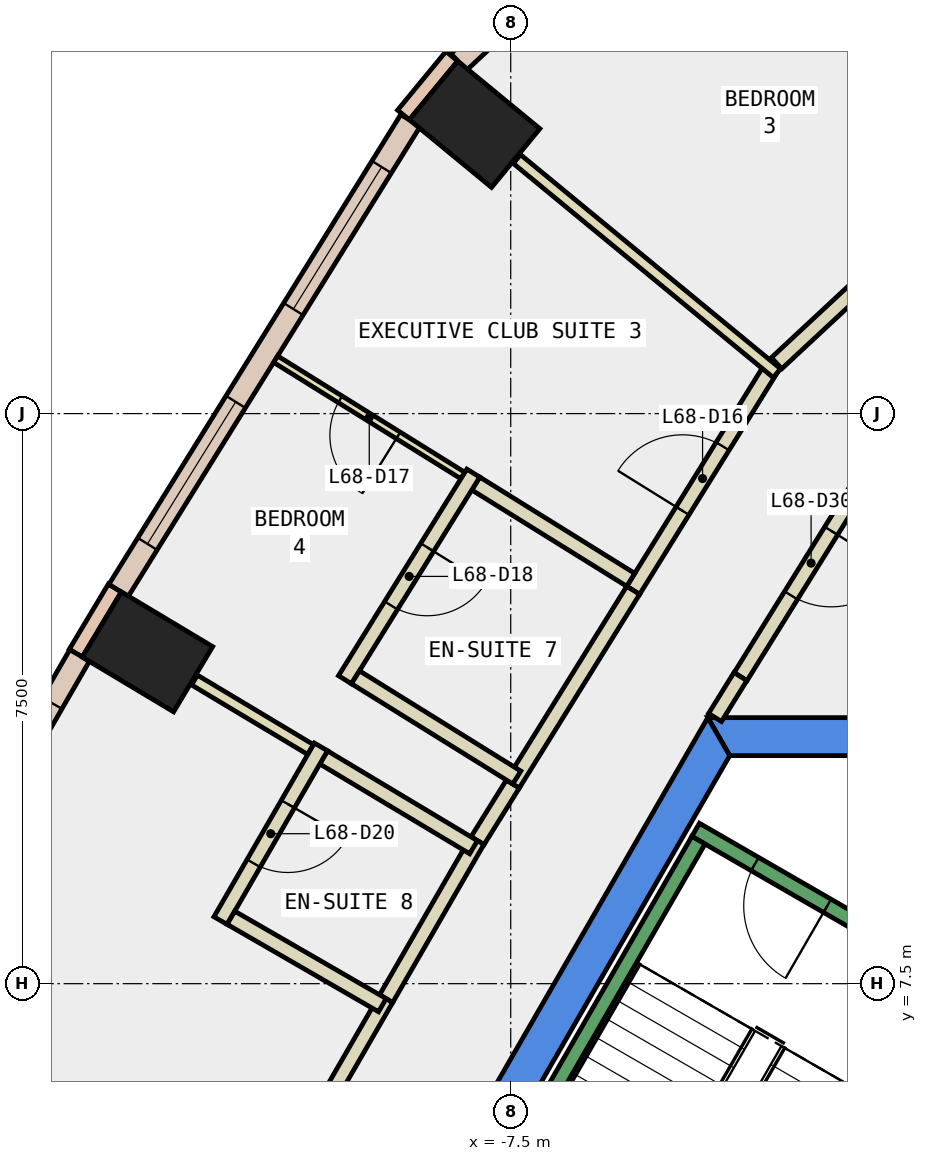
"""IFC4 building model, lengths in metres.
Left out: names, types, materials, properties, quantities, classifications, styles, units other than length and angle.
Written with IfcOpenShell. Run it as: python <this file> out.ifc"""

import sys

from ifc_helpers import new_model, si_unit, direction, frame, frame_2d, origin, origin_2d, place, context, subcontext, project, spatial, polyline, rectangle, outline, extrude, element, fill, save


model = new_model("IFC4")
c1 = context("Model", 3, precision=1e-05, world=origin(), true_north=direction((0.0, 1.0)))
c2 = subcontext(c1, "Body", "Model", "MODEL_VIEW")
j1 = project(units=[si_unit("LENGTHUNIT", "METRE"), si_unit("PLANEANGLEUNIT", "RADIAN")], contexts=[c1])
p1 = place(None, origin())
s1 = spatial("IfcSite", under=j1, at=p1, CompositionType="ELEMENT")
p2 = place(p1, origin())
s2 = spatial("IfcBuilding", under=s1, at=p2, CompositionType="ELEMENT")
p3 = place(p2, frame((0.0, 0.0, 293.6)))
s3 = spatial("IfcBuildingStorey", under=s2, at=p3, CompositionType="ELEMENT", Elevation=293.6)
for number, where, z_axis, x_axis in (
    (1, (-7.975, 18.807, -0.34), (0.0, 0.0, 1.0), (0.636, 0.772, 0.0)),
    (2, (-12.279, 11.865, -0.34), (0.0, 0.0, 1.0), (0.514, 0.858, 0.0)),
):
    element("IfcColumn", number, at=place(p3, frame(where, z_axis=z_axis, x_axis=x_axis)), inside=s3, PredefinedType="COLUMN", context=c2, shape_type="SweptSolid", body=[
        extrude(rectangle(XDim=1.0, YDim=1.4, at=origin_2d()), origin(), (0.0, 0.0, 1.0), 3.6),
    ])
p4 = place(p3, frame((0.0, 0.0, -0.34)))
e3 = element("IfcWall", 3, at=p4, inside=s3, PredefinedType="SHEAR", context=c2, shape_type="SweptSolid", body=[
    extrude(outline(polyline([(4.907, 11.0), (-4.907, 11.0), (-4.619, 10.5), (4.619, 10.5), (4.907, 11.0)])), origin(), (0.0, 0.0, 1.0), 3.6),
])
p5 = place(p3, frame((0.0, 0.0, -0.34)))
e4 = element("IfcWall", 4, at=p5, inside=s3, PredefinedType="SHEAR", context=c2, shape_type="SweptSolid", body=[
    extrude(outline(polyline([(-9.236, 3.502), (-8.803, 3.253), (-4.619, 10.5), (-4.907, 11.0), (-9.236, 3.502)])), origin(), (0.0, 0.0, 1.0), 3.6),
])
for number, where, z_axis, x_axis in (
    (5, (-8.275, 19.701, 0.0), (0.0, 0.0, 1.0), (-0.636, -0.772, 0.0)),
    (6, (-12.708, 12.706, 0.0), (0.0, 0.0, 1.0), (-0.514, -0.858, 0.0)),
):
    element("IfcWall", number, at=place(p3, frame(where, z_axis=z_axis, x_axis=x_axis)), inside=s3, PredefinedType="STANDARD", context=c2, shape_type="SweptSolid", body=[
        extrude(rectangle(XDim=1.0, YDim=0.2, at=frame_2d((0.5, 0.0))), origin(), (0.0, 0.0, 1.0), 3.26),
    ])
p6 = place(p3, frame((-5.241, 22.362, 0.0), z_axis=(0.0, 0.0, 1.0), x_axis=(-0.732397380344, -0.680877431896, 0.0)))
e7 = element("IfcWall", 7, at=p6, inside=s3, PredefinedType="STANDARD", context=c2, shape_type="SweptSolid", body=[
    extrude(rectangle(XDim=4.019, YDim=0.3, at=frame_2d((2.009, 0.0))), origin(), (0.0, 0.0, 1.0), 3.26),
])
p7 = place(p6, frame((1.309, 0.0, 0.9)))
e8 = element("IfcOpeningElement", 8, at=p7, cuts=e7, PredefinedType="OPENING", context=c2, shape_type="SweptSolid", body=[
    extrude(rectangle(XDim=1.4, YDim=2.0, at=frame_2d((0.7, 1.0))), frame((0.0, 0.16, 0.0), z_axis=(0.0, -1.0, 0.0), x_axis=(1.0, 0.0, 0.0)), (0.0, 0.0, 1.0), 0.32),
])
p8 = place(p3, frame((-8.819, 18.855, 0.0), z_axis=(0.0, 0.0, 1.0), x_axis=(-0.527762071678, -0.849392250788, 0.0)))
e9 = element("IfcWall", 9, at=p8, inside=s3, PredefinedType="STANDARD", context=c2, shape_type="SweptSolid", body=[
    extrude(rectangle(XDim=7.276, YDim=0.3, at=frame_2d((3.638, 0.0))), origin(), (0.0, 0.0, 1.0), 3.26),
])
p9 = place(p8, frame((0.719, 0.0, 0.9)))
e10 = element("IfcOpeningElement", 10, at=p9, cuts=e9, PredefinedType="OPENING", context=c2, shape_type="SweptSolid", body=[
    extrude(rectangle(XDim=2.2, YDim=2.0, at=frame_2d((1.1, 1.0))), frame((0.0, 0.16, 0.0), z_axis=(0.0, -1.0, 0.0), x_axis=(1.0, 0.0, 0.0)), (0.0, 0.0, 1.0), 0.32),
])
p10 = place(p8, frame((4.357, 0.0, 0.9)))
e11 = element("IfcOpeningElement", 11, at=p10, cuts=e9, PredefinedType="OPENING", context=c2, shape_type="SweptSolid", body=[
    extrude(rectangle(XDim=2.2, YDim=2.0, at=frame_2d((1.1, 1.0))), frame((0.0, 0.16, 0.0), z_axis=(0.0, -1.0, 0.0), x_axis=(1.0, 0.0, 0.0)), (0.0, 0.0, 1.0), 0.32),
])
p11 = place(p3, frame((-13.172, 11.819, 0.0), z_axis=(0.0, 0.0, 1.0), x_axis=(-0.499945412946, -0.866056917341, 0.0)))
e12 = element("IfcWall", 12, at=p11, inside=s3, PredefinedType="STANDARD", context=c2, shape_type="SweptSolid", body=[
    extrude(rectangle(XDim=7.299, YDim=0.3, at=frame_2d((3.649, 0.0))), origin(), (0.0, 0.0, 1.0), 3.26),
])
p12 = place(p11, frame((0.725, 0.0, 0.9)))
e13 = element("IfcOpeningElement", 13, at=p12, cuts=e12, PredefinedType="OPENING", context=c2, shape_type="SweptSolid", body=[
    extrude(rectangle(XDim=2.2, YDim=2.0, at=frame_2d((1.1, 1.0))), frame((0.0, 0.16, 0.0), z_axis=(0.0, -1.0, 0.0), x_axis=(1.0, 0.0, 0.0)), (0.0, 0.0, 1.0), 0.32),
])
p13 = place(p11, frame((4.374, 0.0, 0.9)))
e14 = element("IfcOpeningElement", 14, at=p13, cuts=e12, PredefinedType="OPENING", context=c2, shape_type="SweptSolid", body=[
    extrude(rectangle(XDim=2.2, YDim=2.0, at=frame_2d((1.1, 1.0))), frame((0.0, 0.16, 0.0), z_axis=(0.0, -1.0, 0.0), x_axis=(1.0, 0.0, 0.0)), (0.0, 0.0, 1.0), 0.32),
])
p14 = place(p3, frame((-2.62, 14.526, 0.0), z_axis=(0.0, 0.0, 1.0), x_axis=(-0.527787942423, -0.849376175692, 0.0)))
e15 = element("IfcWall", 15, at=p14, inside=s3, PredefinedType="PARTITIONING", context=c2, shape_type="SweptSolid", body=[
    extrude(rectangle(XDim=3.517, YDim=0.2, at=frame_2d((1.758, 0.0))), origin(), (0.0, 0.0, 1.0), 3.26),
])
p15 = place(p14, frame((1.258, 0.0, 0.0)))
e16 = element("IfcOpeningElement", 16, at=p15, cuts=e15, PredefinedType="OPENING", context=c2, shape_type="SweptSolid", body=[
    extrude(rectangle(XDim=1.0, YDim=2.1, at=frame_2d((0.5, 1.05))), frame((0.0, 0.11, 0.0), z_axis=(0.0, -1.0, 0.0), x_axis=(1.0, 0.0, 0.0)), (0.0, 0.0, 1.0), 0.22),
])
p16 = place(p3, frame((-4.478, 11.54, 0.0), z_axis=(0.0, 0.0, 1.0), x_axis=(-0.527362861778, -0.849640166198, 0.0)))
e17 = element("IfcWall", 17, at=p16, inside=s3, PredefinedType="PARTITIONING", context=c2, shape_type="SweptSolid", body=[
    extrude(rectangle(XDim=0.633, YDim=0.2, at=frame_2d((0.317, 0.0))), origin(), (0.0, 0.0, 1.0), 3.26),
])
p17 = place(p3, frame((-4.002, 15.663, 0.0), z_axis=(0.0, 0.0, 1.0), x_axis=(0.732331154554, 0.680948661846, 0.0)))
e18 = element("IfcWall", 18, at=p17, inside=s3, PredefinedType="PARTITIONING", context=c2, shape_type="SweptSolid", body=[
    extrude(rectangle(XDim=2.803, YDim=0.2, at=frame_2d((1.402, 0.0))), origin(), (0.0, 0.0, 1.0), 3.26),
])
p18 = place(p3, frame((-5.889, 12.675, 0.0), z_axis=(0.0, 0.0, 1.0), x_axis=(0.527550626699, 0.849523593709, 0.0)))
e19 = element("IfcWall", 19, at=p18, inside=s3, PredefinedType="PARTITIONING", context=c2, shape_type="SweptSolid", body=[
    extrude(rectangle(XDim=3.463, YDim=0.2, at=frame_2d((1.731, 0.0))), origin(), (0.0, 0.0, 1.0), 3.26),
])
p19 = place(p18, frame((1.231, 0.0, 0.0)))
e20 = element("IfcOpeningElement", 20, at=p19, cuts=e19, PredefinedType="OPENING", context=c2, shape_type="SweptSolid", body=[
    extrude(rectangle(XDim=1.0, YDim=2.1, at=frame_2d((0.5, 1.05))), frame((0.0, 0.11, 0.0), z_axis=(0.0, -1.0, 0.0), x_axis=(1.0, 0.0, 0.0)), (0.0, 0.0, 1.0), 0.22),
])
p20 = place(p3, frame((-7.937, 9.38, 0.0), z_axis=(0.0, 0.0, 1.0), x_axis=(0.52850186976, 0.848932137252, 0.0)))
e21 = element("IfcWall", 21, at=p20, inside=s3, PredefinedType="PARTITIONING", context=c2, shape_type="SweptSolid", body=[
    extrude(rectangle(XDim=0.88, YDim=0.2, at=frame_2d((0.44, 0.0))), origin(), (0.0, 0.0, 1.0), 3.26),
])
p21 = place(p3, frame((-7.472, 10.127, 0.0), z_axis=(0.0, 0.0, 1.0), x_axis=(0.527707224705, 0.849426326996, 0.0)))
e22 = element("IfcWall", 22, at=p21, inside=s3, PredefinedType="PARTITIONING", context=c2, shape_type="SweptSolid", body=[
    extrude(rectangle(XDim=3.0, YDim=0.2, at=frame_2d((1.5, 0.0))), origin(), (0.0, 0.0, 1.0), 3.26),
])
p22 = place(p3, frame((-12.082, 2.207, 0.0), z_axis=(0.0, 0.0, 1.0), x_axis=(0.500123454404, 0.865954115618, 0.0)))
e23 = element("IfcWall", 23, at=p22, inside=s3, PredefinedType="PARTITIONING", context=c2, shape_type="SweptSolid", body=[
    extrude(rectangle(XDim=5.885, YDim=0.2, at=frame_2d((2.942, 0.0))), origin(), (0.0, 0.0, 1.0), 3.26),
])
p23 = place(p22, frame((2.493, 0.0, 0.0)))
e24 = element("IfcOpeningElement", 24, at=p23, cuts=e23, PredefinedType="OPENING", context=c2, shape_type="SweptSolid", body=[
    extrude(rectangle(XDim=1.0, YDim=2.1, at=frame_2d((0.5, 1.05))), frame((0.0, 0.11, 0.0), z_axis=(0.0, -1.0, 0.0), x_axis=(1.0, 0.0, 0.0)), (0.0, 0.0, 1.0), 0.22),
])
p24 = place(p3, frame((-9.139, 7.303, 0.0), z_axis=(0.0, 0.0, 1.0), x_axis=(0.499869187296, 0.866100915363, 0.0)))
e25 = element("IfcWall", 25, at=p24, inside=s3, PredefinedType="PARTITIONING", context=c2, shape_type="SweptSolid", body=[
    extrude(rectangle(XDim=2.401, YDim=0.2, at=frame_2d((1.2, 0.0))), origin(), (0.0, 0.0, 1.0), 3.26),
])
p25 = place(p3, frame((-3.998, 15.532, 0.0), z_axis=(0.0, 0.0, 1.0), x_axis=(-0.771938186867, 0.635697597649, 0.0)))
e26 = element("IfcWall", 26, at=p25, inside=s3, PredefinedType="PARTITIONING", context=c2, shape_type="SweptSolid", body=[
    extrude(rectangle(XDim=4.432, YDim=0.15, at=frame_2d((2.216, 0.0))), origin(), (0.0, 0.0, 1.0), 3.26),
])
p26 = place(p3, frame((-8.13, 14.185, 0.0), z_axis=(0.0, 0.0, 1.0), x_axis=(-0.849305726881, 0.527901299759, 0.0)))
e27 = element("IfcWall", 27, at=p26, inside=s3, PredefinedType="PARTITIONING", context=c2, shape_type="SweptSolid", body=[
    extrude(rectangle(XDim=2.9, YDim=0.1, at=frame_2d((1.45, 0.0))), origin(), (0.0, 0.0, 1.0), 3.26),
])
p27 = place(p26, frame((1.0, 0.0, 0.0)))
e28 = element("IfcOpeningElement", 28, at=p27, cuts=e27, PredefinedType="OPENING", context=c2, shape_type="SweptSolid", body=[
    extrude(rectangle(XDim=0.9, YDim=2.1, at=frame_2d((0.45, 1.05))), frame((0.0, 0.06, 0.0), z_axis=(0.0, -1.0, 0.0), x_axis=(1.0, 0.0, 0.0)), (0.0, 0.0, 1.0), 0.12),
])
p28 = place(p3, frame((-5.921, 12.813, 0.0), z_axis=(0.0, 0.0, 1.0), x_axis=(-0.849366650736, 0.527803270752, 0.0)))
e29 = element("IfcWall", 29, at=p28, inside=s3, PredefinedType="PARTITIONING", context=c2, shape_type="SweptSolid", body=[
    extrude(rectangle(XDim=2.401, YDim=0.2, at=frame_2d((1.2, 0.0))), origin(), (0.0, 0.0, 1.0), 3.26),
])
p29 = place(p3, frame((-7.992, 14.217, 0.0), z_axis=(0.0, 0.0, 1.0), x_axis=(-0.527795797674, -0.849371294522, 0.0)))
e30 = element("IfcWall", 30, at=p29, inside=s3, PredefinedType="PARTITIONING", context=c2, shape_type="SweptSolid", body=[
    extrude(rectangle(XDim=3.2, YDim=0.2, at=frame_2d((1.6, 0.0))), origin(), (0.0, 0.0, 1.0), 3.26),
])
p30 = place(p29, frame((1.15, 0.0, 0.0)))
e31 = element("IfcOpeningElement", 31, at=p30, cuts=e30, PredefinedType="OPENING", context=c2, shape_type="SweptSolid", body=[
    extrude(rectangle(XDim=0.9, YDim=2.1, at=frame_2d((0.45, 1.05))), frame((0.0, 0.11, 0.0), z_axis=(0.0, -1.0, 0.0), x_axis=(1.0, 0.0, 0.0)), (0.0, 0.0, 1.0), 0.22),
])
p31 = place(p3, frame((-9.543, 11.531, 0.0), z_axis=(0.0, 0.0, 1.0), x_axis=(0.849400119549, -0.527749407305, 0.0)))
e32 = element("IfcWall", 32, at=p31, inside=s3, PredefinedType="PARTITIONING", context=c2, shape_type="SweptSolid", body=[
    extrude(rectangle(XDim=2.5, YDim=0.2, at=frame_2d((1.25, 0.0))), origin(), (0.0, 0.0, 1.0), 3.26),
])
p32 = place(p3, frame((-10.133, 10.58, 0.0), z_axis=(0.0, 0.0, 1.0), x_axis=(-0.857903919212, 0.513810145287, 0.0)))
e33 = element("IfcWall", 33, at=p32, inside=s3, PredefinedType="PARTITIONING", context=c2, shape_type="SweptSolid", body=[
    extrude(rectangle(XDim=1.781, YDim=0.15, at=frame_2d((0.891, 0.0))), origin(), (0.0, 0.0, 1.0), 3.26),
])
p33 = place(p3, frame((-7.989, 9.295, 0.0), z_axis=(0.0, 0.0, 1.0), x_axis=(-0.857801856135, 0.513980520654, 0.0)))
e34 = element("IfcWall", 34, at=p33, inside=s3, PredefinedType="PARTITIONING", context=c2, shape_type="SweptSolid", body=[
    extrude(rectangle(XDim=2.3, YDim=0.2, at=frame_2d((1.15, 0.0))), origin(), (0.0, 0.0, 1.0), 3.26),
])
p34 = place(p3, frame((-9.997, 10.615, 0.0), z_axis=(0.0, 0.0, 1.0), x_axis=(-0.500525697837, -0.865721679182, 0.0)))
e35 = element("IfcWall", 35, at=p34, inside=s3, PredefinedType="PARTITIONING", context=c2, shape_type="SweptSolid", body=[
    extrude(rectangle(XDim=2.639, YDim=0.2, at=frame_2d((1.32, 0.0))), origin(), (0.0, 0.0, 1.0), 3.26),
])
p35 = place(p34, frame((0.869, 0.0, 0.0)))
e36 = element("IfcOpeningElement", 36, at=p35, cuts=e35, PredefinedType="OPENING", context=c2, shape_type="SweptSolid", body=[
    extrude(rectangle(XDim=0.9, YDim=2.1, at=frame_2d((0.45, 1.05))), frame((0.0, 0.11, 0.0), z_axis=(0.0, -1.0, 0.0), x_axis=(1.0, 0.0, 0.0)), (0.0, 0.0, 1.0), 0.22),
])
p36 = place(p3, frame((-11.181, 8.367, 0.0), z_axis=(0.0, 0.0, 1.0), x_axis=(0.866053019151, -0.499952165731, 0.0)))
e37 = element("IfcWall", 37, at=p36, inside=s3, PredefinedType="PARTITIONING", context=c2, shape_type="SweptSolid", body=[
    extrude(rectangle(XDim=2.3, YDim=0.2, at=frame_2d((1.15, 0.0))), origin(), (0.0, 0.0, 1.0), 3.26),
])
p37 = place(p3, frame((-1.256, 7.324, 0.0), z_axis=(0.0, 0.0, 1.0), x_axis=(-0.866046073146, 0.499964197906, 0.0)))
e38 = element("IfcWall", 38, at=p37, inside=s3, PredefinedType="STANDARD", context=c2, shape_type="SweptSolid", body=[
    extrude(rectangle(XDim=4.4, YDim=0.2, at=frame_2d((2.2, 0.0))), origin(), (0.0, 0.0, 1.0), 3.26),
])
p38 = place(p37, frame((2.4, 0.0, 0.0)))
e39 = element("IfcOpeningElement", 39, at=p38, cuts=e38, PredefinedType="OPENING", context=c2, shape_type="SweptSolid", body=[
    extrude(rectangle(XDim=1.1, YDim=2.2, at=frame_2d((0.55, 1.1))), frame((0.0, 0.11, 0.0), z_axis=(0.0, -1.0, 0.0), x_axis=(1.0, 0.0, 0.0)), (0.0, 0.0, 1.0), 0.22),
])
p39 = place(p3, frame((-1.393, 7.288, 0.0), z_axis=(0.0, 0.0, 1.0), x_axis=(-0.499963383562, -0.866046543262, 0.0)))
e40 = element("IfcWall", 40, at=p39, inside=s3, PredefinedType="STANDARD", context=c2, shape_type="SweptSolid", body=[
    extrude(rectangle(XDim=6.9, YDim=0.2, at=frame_2d((3.45, 0.0))), origin(), (0.0, 0.0, 1.0), 3.26),
])
p40 = place(p39, frame((0.45, 0.0, 0.0)))
e41 = element("IfcOpeningElement", 41, at=p40, cuts=e40, PredefinedType="OPENING", context=c2, shape_type="SweptSolid", body=[
    extrude(rectangle(XDim=1.1, YDim=2.2, at=frame_2d((0.55, 1.1))), frame((0.0, 0.11, 0.0), z_axis=(0.0, -1.0, 0.0), x_axis=(1.0, 0.0, 0.0)), (0.0, 0.0, 1.0), 0.22),
])
p41 = place(p3, frame((-5.03, 9.388, 0.0), z_axis=(0.0, 0.0, 1.0), x_axis=(-0.499978703459, -0.866037698999, 0.0)))
e42 = element("IfcWall", 42, at=p41, inside=s3, PredefinedType="STANDARD", context=c2, shape_type="SweptSolid", body=[
    extrude(rectangle(XDim=6.9, YDim=0.2, at=frame_2d((3.45, 0.0))), origin(), (0.0, 0.0, 1.0), 3.26),
])
p42 = place(p9, origin())
e43 = element("IfcWindow", 43, at=p42, inside=s3, PartitioningType="SINGLE_PANEL", PredefinedType="WINDOW", context=c2, shape_type="SweptSolid", body=[
    extrude(rectangle(XDim=2.2, YDim=2.0, at=frame_2d((1.1, 1.0))), frame((0.0, 0.03, 0.0), z_axis=(0.0, -1.0, 0.0), x_axis=(1.0, 0.0, 0.0)), (0.0, 0.0, 1.0), 0.06),
])
fill(e10, e43)
p43 = place(p10, origin())
e44 = element("IfcWindow", 44, at=p43, inside=s3, PartitioningType="SINGLE_PANEL", PredefinedType="WINDOW", context=c2, shape_type="SweptSolid", body=[
    extrude(rectangle(XDim=2.2, YDim=2.0, at=frame_2d((1.1, 1.0))), frame((0.0, 0.03, 0.0), z_axis=(0.0, -1.0, 0.0), x_axis=(1.0, 0.0, 0.0)), (0.0, 0.0, 1.0), 0.06),
])
fill(e11, e44)
p44 = place(p12, origin())
e45 = element("IfcWindow", 45, at=p44, inside=s3, PartitioningType="SINGLE_PANEL", PredefinedType="WINDOW", context=c2, shape_type="SweptSolid", body=[
    extrude(rectangle(XDim=2.2, YDim=2.0, at=frame_2d((1.1, 1.0))), frame((0.0, 0.03, 0.0), z_axis=(0.0, -1.0, 0.0), x_axis=(1.0, 0.0, 0.0)), (0.0, 0.0, 1.0), 0.06),
])
fill(e13, e45)
p45 = place(p19, origin())
e46 = element("IfcDoor", 46, at=p45, inside=s3, OperationType="SINGLE_SWING_LEFT", PredefinedType="DOOR", context=c2, shape_type="SweptSolid", body=[
    extrude(rectangle(XDim=1.0, YDim=2.1, at=frame_2d((0.5, 1.05))), frame((0.0, 0.025, 0.0), z_axis=(0.0, -1.0, 0.0), x_axis=(1.0, 0.0, 0.0)), (0.0, 0.0, 1.0), 0.05),
])
fill(e20, e46)
p46 = place(p27, origin())
e47 = element("IfcDoor", 47, at=p46, inside=s3, OperationType="SINGLE_SWING_LEFT", PredefinedType="DOOR", context=c2, shape_type="SweptSolid", body=[
    extrude(rectangle(XDim=0.9, YDim=2.1, at=frame_2d((0.45, 1.05))), frame((0.0, 0.025, 0.0), z_axis=(0.0, -1.0, 0.0), x_axis=(1.0, 0.0, 0.0)), (0.0, 0.0, 1.0), 0.05),
])
fill(e28, e47)
p47 = place(p30, origin())
e48 = element("IfcDoor", 48, at=p47, inside=s3, OperationType="SINGLE_SWING_LEFT", PredefinedType="DOOR", context=c2, shape_type="SweptSolid", body=[
    extrude(rectangle(XDim=0.9, YDim=2.1, at=frame_2d((0.45, 1.05))), frame((0.0, 0.025, 0.0), z_axis=(0.0, -1.0, 0.0), x_axis=(1.0, 0.0, 0.0)), (0.0, 0.0, 1.0), 0.05),
])
fill(e31, e48)
p48 = place(p35, origin())
e49 = element("IfcDoor", 49, at=p48, inside=s3, OperationType="SINGLE_SWING_LEFT", PredefinedType="DOOR", context=c2, shape_type="SweptSolid", body=[
    extrude(rectangle(XDim=0.9, YDim=2.1, at=frame_2d((0.45, 1.05))), frame((0.0, 0.025, 0.0), z_axis=(0.0, -1.0, 0.0), x_axis=(1.0, 0.0, 0.0)), (0.0, 0.0, 1.0), 0.05),
])
fill(e36, e49)
p49 = place(p15, origin())
e50 = element("IfcDoor", 50, at=p49, inside=s3, OperationType="SINGLE_SWING_RIGHT", PredefinedType="DOOR", context=c2, shape_type="SweptSolid", body=[
    extrude(rectangle(XDim=1.0, YDim=2.1, at=frame_2d((0.5, 1.05))), frame((0.0, 0.025, 0.0), z_axis=(0.0, -1.0, 0.0), x_axis=(1.0, 0.0, 0.0)), (0.0, 0.0, 1.0), 0.05),
])
fill(e16, e50)
p50 = place(p38, origin())
e51 = element("IfcDoor", 51, at=p50, inside=s3, OperationType="SINGLE_SWING_LEFT", PredefinedType="DOOR", context=c2, shape_type="SweptSolid", body=[
    extrude(rectangle(XDim=1.1, YDim=2.2, at=frame_2d((0.55, 1.1))), frame((0.0, 0.025, 0.0), z_axis=(0.0, -1.0, 0.0), x_axis=(1.0, 0.0, 0.0)), (0.0, 0.0, 1.0), 0.05),
])
fill(e39, e51)
save(model, sys.argv[1])
